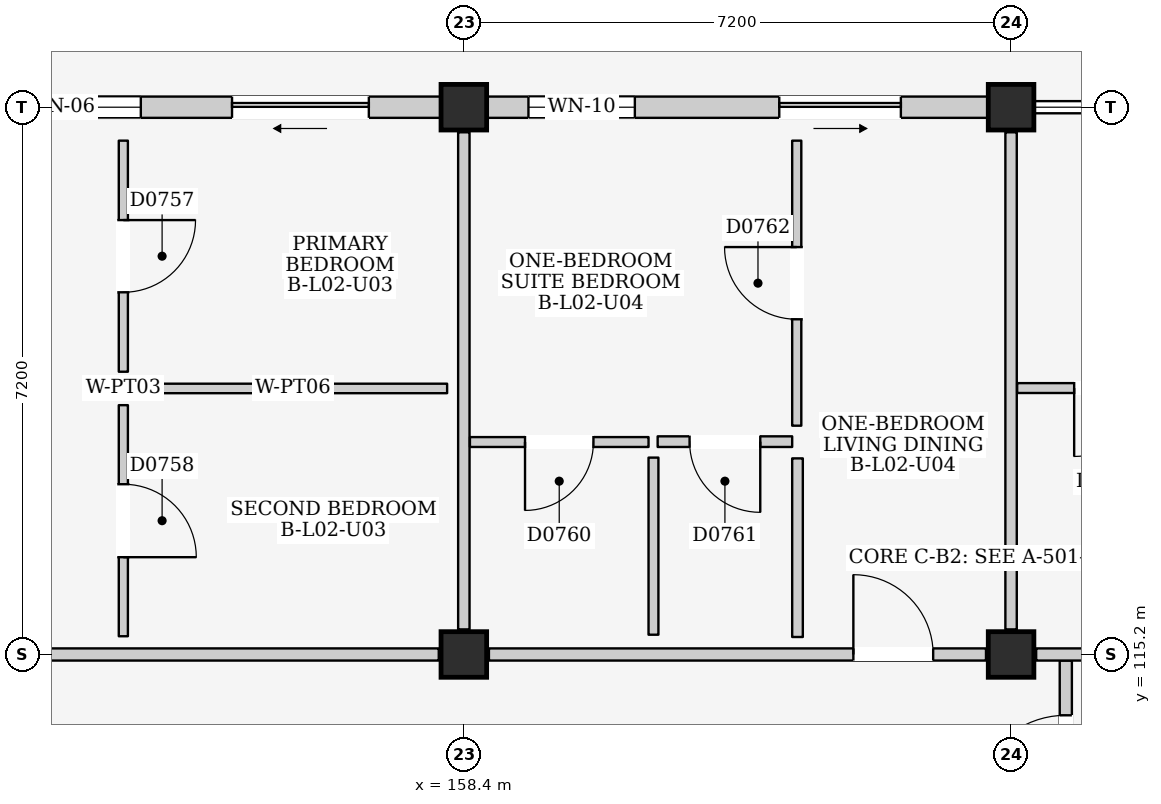
"""IFC4 building model, lengths in metres.
Left out: names, types, materials, properties, quantities, classifications, styles, units other than length and angle.
Written with IfcOpenShell. Run it as: python <this file> out.ifc"""

import sys

from ifc_helpers import new_model, si_unit, direction, frame, frame_2d, origin, origin_2d, place, context, subcontext, project, spatial, rectangle, extrude, element, fill, save


model = new_model("IFC4")
c1 = context("Model", 3, precision=1e-05, world=origin(), true_north=direction((0.0, 1.0)))
c2 = subcontext(c1, "Body", "Model", "MODEL_VIEW")
j1 = project(units=[si_unit("LENGTHUNIT", "METRE"), si_unit("PLANEANGLEUNIT", "RADIAN")], contexts=[c1])
p1 = place(None, origin())
s1 = spatial("IfcSite", under=j1, at=p1, CompositionType="ELEMENT")
p2 = place(p1, origin())
s2 = spatial("IfcBuilding", under=s1, at=p2, CompositionType="ELEMENT")
p3 = place(p2, frame((0.0, 0.0, 9.0)))
s3 = spatial("IfcBuildingStorey", under=s2, at=p3, CompositionType="ELEMENT", Elevation=9.0)
for number, where, z_axis, x_axis in (
    (1, (158.4, 115.2, 0.0), (0.0, 0.0, 1.0), (1.0, 0.0, 0.0)),
    (2, (158.4, 122.4, 0.0), (0.0, 0.0, 1.0), (1.0, 0.0, 0.0)),
    (3, (165.6, 115.2, 0.0), (0.0, 0.0, 1.0), (1.0, 0.0, 0.0)),
    (4, (165.6, 122.4, 0.0), (0.0, 0.0, 1.0), (1.0, 0.0, 0.0)),
):
    element("IfcColumn", number, at=place(p3, frame(where, z_axis=z_axis, x_axis=x_axis)), inside=s3, PredefinedType="COLUMN", context=c2, shape_type="SweptSolid", body=[
        extrude(rectangle(XDim=0.6, YDim=0.6, at=origin_2d()), origin(), (0.0, 0.0, 1.0), 3.2),
    ])
p4 = place(p3, frame((151.5, 122.4, 0.0), z_axis=(0.0, 0.0, 1.0), x_axis=(1.0, 0.0, 0.0)))
e5 = element("IfcWall", 5, at=p4, inside=s3, PredefinedType="ELEMENTEDWALL", context=c2, shape_type="SweptSolid", body=[
    extrude(rectangle(XDim=6.6, YDim=0.28, at=frame_2d((3.3, 0.0))), origin(), (0.0, 0.0, 1.0), 2.425),
])
p5 = place(p4, frame((3.85, 0.0, 0.0)))
e6 = element("IfcOpeningElement", 6, at=p5, cuts=e5, PredefinedType="OPENING", context=c2, shape_type="SweptSolid", body=[
    extrude(rectangle(XDim=1.8, YDim=2.12, at=frame_2d((0.9, 1.06))), frame((0.0, 0.155, 0.0), z_axis=(0.0, -1.0, 0.0), x_axis=(1.0, 0.0, 0.0)), (0.0, 0.0, 1.0), 0.31),
])
p6 = place(p4, frame((0.55, 0.0, 0.665)))
e7 = element("IfcOpeningElement", 7, at=p6, cuts=e5, PredefinedType="OPENING", context=c2, shape_type="SweptSolid", body=[
    extrude(rectangle(XDim=2.1, YDim=1.65, at=frame_2d((1.05, 0.825))), frame((0.0, 0.155, 0.0), z_axis=(0.0, -1.0, 0.0), x_axis=(1.0, 0.0, 0.0)), (0.0, 0.0, 1.0), 0.31),
])
p7 = place(p3, frame((158.7, 122.4, 0.0), z_axis=(0.0, 0.0, 1.0), x_axis=(1.0, 0.0, 0.0)))
e8 = element("IfcWall", 8, at=p7, inside=s3, PredefinedType="ELEMENTEDWALL", context=c2, shape_type="SweptSolid", body=[
    extrude(rectangle(XDim=6.6, YDim=0.28, at=frame_2d((3.3, 0.0))), origin(), (0.0, 0.0, 1.0), 2.425),
])
p8 = place(p7, frame((3.85, 0.0, 0.0)))
e9 = element("IfcOpeningElement", 9, at=p8, cuts=e8, PredefinedType="OPENING", context=c2, shape_type="SweptSolid", body=[
    extrude(rectangle(XDim=1.6, YDim=2.12, at=frame_2d((0.8, 1.06))), frame((0.0, 0.155, 0.0), z_axis=(0.0, -1.0, 0.0), x_axis=(1.0, 0.0, 0.0)), (0.0, 0.0, 1.0), 0.31),
])
p9 = place(p7, frame((0.55, 0.0, 0.9)))
e10 = element("IfcOpeningElement", 10, at=p9, cuts=e8, PredefinedType="OPENING", context=c2, shape_type="SweptSolid", body=[
    extrude(rectangle(XDim=1.4, YDim=1.2, at=frame_2d((0.7, 0.6))), frame((0.0, 0.155, 0.0), z_axis=(0.0, -1.0, 0.0), x_axis=(1.0, 0.0, 0.0)), (0.0, 0.0, 1.0), 0.31),
])
p10 = place(p3, frame((166.32, 110.8, 0.0), z_axis=(0.0, 0.0, 1.0), x_axis=(0.0, 1.0, 0.0)))
e11 = element("IfcWall", 11, at=p10, inside=s3, PredefinedType="PARTITIONING", context=c2, shape_type="SweptSolid", body=[
    extrude(rectangle(XDim=4.32, YDim=0.16, at=frame_2d((2.16, 0.0))), origin(), (0.0, 0.0, 1.0), 2.96),
])
p11 = place(p10, frame((2.4, 0.0, 0.0)))
e12 = element("IfcOpeningElement", 12, at=p11, cuts=e11, PredefinedType="OPENING", context=c2, shape_type="SweptSolid", body=[
    extrude(rectangle(XDim=1.2, YDim=2.2, at=frame_2d((0.6, 1.1))), frame((0.0, 0.095, 0.0), z_axis=(0.0, -1.0, 0.0), x_axis=(1.0, 0.0, 0.0)), (0.0, 0.0, 1.0), 0.19),
])
p12 = place(p3, frame((151.53, 115.2, 0.0), z_axis=(0.0, 0.0, 1.0), x_axis=(1.0, 0.0, 0.0)))
e13 = element("IfcWall", 13, at=p12, inside=s3, PredefinedType="PARTITIONING", context=c2, shape_type="SweptSolid", body=[
    extrude(rectangle(XDim=6.54, YDim=0.16, at=frame_2d((3.27, 0.0))), origin(), (0.0, 0.0, 1.0), 2.345),
])
p13 = place(p12, frame((0.18, 0.0, 0.0)))
e14 = element("IfcOpeningElement", 14, at=p13, cuts=e13, PredefinedType="OPENING", context=c2, shape_type="SweptSolid", body=[
    extrude(rectangle(XDim=1.05, YDim=2.15, at=frame_2d((0.525, 1.075))), frame((0.0, 0.095, 0.0), z_axis=(0.0, -1.0, 0.0), x_axis=(1.0, 0.0, 0.0)), (0.0, 0.0, 1.0), 0.19),
])
p14 = place(p3, frame((158.4, 115.53, 0.0), z_axis=(0.0, 0.0, 1.0), x_axis=(0.0, 1.0, 0.0)))
e15 = element("IfcWall", 15, at=p14, inside=s3, PredefinedType="PARTITIONING", context=c2, shape_type="SweptSolid", body=[
    extrude(rectangle(XDim=6.54, YDim=0.15, at=frame_2d((3.27, 0.0))), origin(), (0.0, 0.0, 1.0), 2.395),
])
p15 = place(p3, frame((153.92, 118.92, 0.0), z_axis=(0.0, 0.0, 1.0), x_axis=(0.0, 1.0, 0.0)))
e16 = element("IfcWall", 16, at=p15, inside=s3, PredefinedType="PARTITIONING", context=c2, shape_type="SweptSolid", body=[
    extrude(rectangle(XDim=3.04, YDim=0.12, at=frame_2d((1.52, 0.0))), origin(), (0.0, 0.0, 1.0), 2.96),
])
p16 = place(p15, frame((1.045, 0.0, 0.0)))
e17 = element("IfcOpeningElement", 17, at=p16, cuts=e16, PredefinedType="OPENING", context=c2, shape_type="SweptSolid", body=[
    extrude(rectangle(XDim=0.95, YDim=2.15, at=frame_2d((0.475, 1.075))), frame((0.0, 0.075, 0.0), z_axis=(0.0, -1.0, 0.0), x_axis=(1.0, 0.0, 0.0)), (0.0, 0.0, 1.0), 0.15),
])
p17 = place(p3, frame((154.12, 118.7, 0.0), z_axis=(0.0, 0.0, 1.0), x_axis=(1.0, 0.0, 0.0)))
e18 = element("IfcWall", 18, at=p17, inside=s3, PredefinedType="PARTITIONING", context=c2, shape_type="SweptSolid", body=[
    extrude(rectangle(XDim=4.06, YDim=0.125, at=frame_2d((2.03, 0.0))), origin(), (0.0, 0.0, 1.0), 2.96),
])
p18 = place(p3, frame((153.92, 115.44, 0.0), z_axis=(0.0, 0.0, 1.0), x_axis=(0.0, 1.0, 0.0)))
e19 = element("IfcWall", 19, at=p18, inside=s3, PredefinedType="PARTITIONING", context=c2, shape_type="SweptSolid", body=[
    extrude(rectangle(XDim=3.04, YDim=0.12, at=frame_2d((1.52, 0.0))), origin(), (0.0, 0.0, 1.0), 2.96),
])
p19 = place(p18, frame((1.04, 0.0, 0.0)))
e20 = element("IfcOpeningElement", 20, at=p19, cuts=e19, PredefinedType="OPENING", context=c2, shape_type="SweptSolid", body=[
    extrude(rectangle(XDim=0.96, YDim=2.15, at=frame_2d((0.48, 1.075))), frame((0.0, 0.075, 0.0), z_axis=(0.0, -1.0, 0.0), x_axis=(1.0, 0.0, 0.0)), (0.0, 0.0, 1.0), 0.15),
])
p20 = place(p3, frame((158.73, 115.2, 0.0), z_axis=(0.0, 0.0, 1.0), x_axis=(1.0, 0.0, 0.0)))
e21 = element("IfcWall", 21, at=p20, inside=s3, PredefinedType="PARTITIONING", context=c2, shape_type="SweptSolid", body=[
    extrude(rectangle(XDim=6.54, YDim=0.16, at=frame_2d((3.27, 0.0))), origin(), (0.0, 0.0, 1.0), 2.345),
])
p21 = place(p20, frame((4.795, 0.0, 0.0)))
e22 = element("IfcOpeningElement", 22, at=p21, cuts=e21, PredefinedType="OPENING", context=c2, shape_type="SweptSolid", body=[
    extrude(rectangle(XDim=1.05, YDim=2.15, at=frame_2d((0.525, 1.075))), frame((0.0, 0.095, 0.0), z_axis=(0.0, -1.0, 0.0), x_axis=(1.0, 0.0, 0.0)), (0.0, 0.0, 1.0), 0.19),
])
p22 = place(p3, frame((165.6, 115.53, 0.0), z_axis=(0.0, 0.0, 1.0), x_axis=(0.0, 1.0, 0.0)))
e23 = element("IfcWall", 23, at=p22, inside=s3, PredefinedType="PARTITIONING", context=c2, shape_type="SweptSolid", body=[
    extrude(rectangle(XDim=6.54, YDim=0.15, at=frame_2d((3.27, 0.0))), origin(), (0.0, 0.0, 1.0), 2.395),
])
p23 = place(p3, frame((158.48, 117.995, 0.0), z_axis=(0.0, 0.0, 1.0), x_axis=(1.0, 0.0, 0.0)))
e24 = element("IfcWall", 24, at=p23, inside=s3, PredefinedType="PARTITIONING", context=c2, shape_type="SweptSolid", body=[
    extrude(rectangle(XDim=2.35, YDim=0.13, at=frame_2d((1.175, 0.0))), origin(), (0.0, 0.0, 1.0), 2.96),
])
p24 = place(p23, frame((0.725, 0.0, 0.0)))
e25 = element("IfcOpeningElement", 25, at=p24, cuts=e24, PredefinedType="OPENING", context=c2, shape_type="SweptSolid", body=[
    extrude(rectangle(XDim=0.9, YDim=2.1, at=frame_2d((0.45, 1.05))), frame((0.0, 0.08, 0.0), z_axis=(0.0, -1.0, 0.0), x_axis=(1.0, 0.0, 0.0)), (0.0, 0.0, 1.0), 0.16),
])
p25 = place(p3, frame((160.895, 115.46, 0.0), z_axis=(0.0, 0.0, 1.0), x_axis=(0.0, 1.0, 0.0)))
e26 = element("IfcWall", 26, at=p25, inside=s3, PredefinedType="PARTITIONING", context=c2, shape_type="SweptSolid", body=[
    extrude(rectangle(XDim=2.33, YDim=0.13, at=frame_2d((1.165, 0.0))), origin(), (0.0, 0.0, 1.0), 2.96),
])
p26 = place(p3, frame((160.95, 118.0, 0.0), z_axis=(0.0, 0.0, 1.0), x_axis=(1.0, 0.0, 0.0)))
e27 = element("IfcWall", 27, at=p26, inside=s3, PredefinedType="PARTITIONING", context=c2, shape_type="SweptSolid", body=[
    extrude(rectangle(XDim=1.77, YDim=0.14, at=frame_2d((0.885, 0.0))), origin(), (0.0, 0.0, 1.0), 2.96),
])
p27 = place(p26, frame((0.42, 0.0, 0.0)))
e28 = element("IfcOpeningElement", 28, at=p27, cuts=e27, PredefinedType="OPENING", context=c2, shape_type="SweptSolid", body=[
    extrude(rectangle(XDim=0.93, YDim=2.14, at=frame_2d((0.465, 1.07))), frame((0.0, 0.085, 0.0), z_axis=(0.0, -1.0, 0.0), x_axis=(1.0, 0.0, 0.0)), (0.0, 0.0, 1.0), 0.17),
])
p28 = place(p3, frame((162.79, 115.43, 0.0), z_axis=(0.0, 0.0, 1.0), x_axis=(0.0, 1.0, 0.0)))
e29 = element("IfcWall", 29, at=p28, inside=s3, PredefinedType="PARTITIONING", context=c2, shape_type="SweptSolid", body=[
    extrude(rectangle(XDim=2.35, YDim=0.14, at=frame_2d((1.175, 0.0))), origin(), (0.0, 0.0, 1.0), 2.96),
])
p29 = place(p3, frame((162.78, 118.21, 0.0), z_axis=(0.0, 0.0, 1.0), x_axis=(0.0, 1.0, 0.0)))
e30 = element("IfcWall", 30, at=p29, inside=s3, PredefinedType="PARTITIONING", context=c2, shape_type="SweptSolid", body=[
    extrude(rectangle(XDim=3.75, YDim=0.12, at=frame_2d((1.875, 0.0))), origin(), (0.0, 0.0, 1.0), 2.96),
])
p30 = place(p29, frame((1.4, 0.0, 0.0)))
e31 = element("IfcOpeningElement", 31, at=p30, cuts=e30, PredefinedType="OPENING", context=c2, shape_type="SweptSolid", body=[
    extrude(rectangle(XDim=0.95, YDim=2.15, at=frame_2d((0.475, 1.075))), frame((0.0, 0.075, 0.0), z_axis=(0.0, -1.0, 0.0), x_axis=(1.0, 0.0, 0.0)), (0.0, 0.0, 1.0), 0.15),
])
p31 = place(p3, frame((165.93, 115.2, 0.0), z_axis=(0.0, 0.0, 1.0), x_axis=(1.0, 0.0, 0.0)))
e32 = element("IfcWall", 32, at=p31, inside=s3, PredefinedType="PARTITIONING", context=c2, shape_type="SweptSolid", body=[
    extrude(rectangle(XDim=6.54, YDim=0.16, at=frame_2d((3.27, 0.0))), origin(), (0.0, 0.0, 1.0), 2.345),
])
p32 = place(p3, frame((165.68, 118.705, 0.0), z_axis=(0.0, 0.0, 1.0), x_axis=(1.0, 0.0, 0.0)))
e33 = element("IfcWall", 33, at=p32, inside=s3, PredefinedType="PARTITIONING", context=c2, shape_type="SweptSolid", body=[
    extrude(rectangle(XDim=2.4, YDim=0.13, at=frame_2d((1.2, 0.0))), origin(), (0.0, 0.0, 1.0), 2.96),
])
p33 = place(p32, frame((0.75, 0.0, 0.0)))
e34 = element("IfcOpeningElement", 34, at=p33, cuts=e33, PredefinedType="OPENING", context=c2, shape_type="SweptSolid", body=[
    extrude(rectangle(XDim=0.9, YDim=2.1, at=frame_2d((0.45, 1.05))), frame((0.0, 0.08, 0.0), z_axis=(0.0, -1.0, 0.0), x_axis=(1.0, 0.0, 0.0)), (0.0, 0.0, 1.0), 0.16),
])
p34 = place(p5, frame((1.8, 0.0, 0.0), z_axis=(0.0, 0.0, 1.0), x_axis=(-1.0, 0.0, 0.0)))
e35 = element("IfcDoor", 35, at=p34, inside=s3, OperationType="SLIDING_TO_LEFT", PredefinedType="DOOR", context=c2, shape_type="SweptSolid", body=[
    extrude(rectangle(XDim=1.8, YDim=2.12, at=frame_2d((0.9, 1.06))), frame((0.0, 0.025, 0.0), z_axis=(0.0, -1.0, 0.0), x_axis=(1.0, 0.0, 0.0)), (0.0, 0.0, 1.0), 0.05),
])
fill(e6, e35)
p35 = place(p6, origin())
e36 = element("IfcWindow", 36, at=p35, inside=s3, PartitioningType="DOUBLE_PANEL_VERTICAL", PredefinedType="WINDOW", context=c2, shape_type="SweptSolid", body=[
    extrude(rectangle(XDim=2.1, YDim=1.65, at=frame_2d((1.05, 0.825))), frame((0.0, 0.03, 0.0), z_axis=(0.0, -1.0, 0.0), x_axis=(1.0, 0.0, 0.0)), (0.0, 0.0, 1.0), 0.06),
])
fill(e7, e36)
p36 = place(p8, frame((1.6, 0.0, 0.0), z_axis=(0.0, 0.0, 1.0), x_axis=(-1.0, 0.0, 0.0)))
e37 = element("IfcDoor", 37, at=p36, inside=s3, OperationType="SLIDING_TO_RIGHT", PredefinedType="DOOR", context=c2, shape_type="SweptSolid", body=[
    extrude(rectangle(XDim=1.6, YDim=2.12, at=frame_2d((0.8, 1.06))), frame((0.0, 0.025, 0.0), z_axis=(0.0, -1.0, 0.0), x_axis=(1.0, 0.0, 0.0)), (0.0, 0.0, 1.0), 0.05),
])
fill(e9, e37)
p37 = place(p9, origin())
e38 = element("IfcWindow", 38, at=p37, inside=s3, PartitioningType="DOUBLE_PANEL_HORIZONTAL", PredefinedType="WINDOW", context=c2, shape_type="SweptSolid", body=[
    extrude(rectangle(XDim=1.4, YDim=1.2, at=frame_2d((0.7, 0.6))), frame((0.0, 0.03, 0.0), z_axis=(0.0, -1.0, 0.0), x_axis=(1.0, 0.0, 0.0)), (0.0, 0.0, 1.0), 0.06),
])
fill(e10, e38)
p38 = place(p11, origin())
e39 = element("IfcDoor", 39, at=p38, inside=s3, OperationType="SINGLE_SWING_LEFT", PredefinedType="DOOR", context=c2, shape_type="SweptSolid", body=[
    extrude(rectangle(XDim=1.2, YDim=2.2, at=frame_2d((0.6, 1.1))), frame((0.0, 0.025, 0.0), z_axis=(0.0, -1.0, 0.0), x_axis=(1.0, 0.0, 0.0)), (0.0, 0.0, 1.0), 0.05),
])
fill(e12, e39)
p39 = place(p16, frame((0.95, 0.0, 0.0), z_axis=(0.0, 0.0, 1.0), x_axis=(-1.0, 0.0, 0.0)))
e40 = element("IfcDoor", 40, at=p39, inside=s3, OperationType="SINGLE_SWING_LEFT", PredefinedType="DOOR", context=c2, shape_type="SweptSolid", body=[
    extrude(rectangle(XDim=0.95, YDim=2.15, at=frame_2d((0.475, 1.075))), frame((0.0, 0.025, 0.0), z_axis=(0.0, -1.0, 0.0), x_axis=(1.0, 0.0, 0.0)), (0.0, 0.0, 1.0), 0.05),
])
fill(e17, e40)
p40 = place(p19, frame((0.96, 0.0, 0.0), z_axis=(0.0, 0.0, 1.0), x_axis=(-1.0, 0.0, 0.0)))
e41 = element("IfcDoor", 41, at=p40, inside=s3, OperationType="SINGLE_SWING_RIGHT", PredefinedType="DOOR", context=c2, shape_type="SweptSolid", body=[
    extrude(rectangle(XDim=0.96, YDim=2.15, at=frame_2d((0.48, 1.075))), frame((0.0, 0.025, 0.0), z_axis=(0.0, -1.0, 0.0), x_axis=(1.0, 0.0, 0.0)), (0.0, 0.0, 1.0), 0.05),
])
fill(e20, e41)
p41 = place(p21, origin())
e42 = element("IfcDoor", 42, at=p41, inside=s3, OperationType="SINGLE_SWING_LEFT", PredefinedType="DOOR", context=c2, shape_type="SweptSolid", body=[
    extrude(rectangle(XDim=1.05, YDim=2.15, at=frame_2d((0.525, 1.075))), frame((0.0, 0.025, 0.0), z_axis=(0.0, -1.0, 0.0), x_axis=(1.0, 0.0, 0.0)), (0.0, 0.0, 1.0), 0.05),
])
fill(e22, e42)
p42 = place(p24, frame((0.9, 0.0, 0.0), z_axis=(0.0, 0.0, 1.0), x_axis=(-1.0, 0.0, 0.0)))
e43 = element("IfcDoor", 43, at=p42, inside=s3, OperationType="SINGLE_SWING_RIGHT", PredefinedType="DOOR", context=c2, shape_type="SweptSolid", body=[
    extrude(rectangle(XDim=0.9, YDim=2.1, at=frame_2d((0.45, 1.05))), frame((0.0, 0.025, 0.0), z_axis=(0.0, -1.0, 0.0), x_axis=(1.0, 0.0, 0.0)), (0.0, 0.0, 1.0), 0.05),
])
fill(e25, e43)
p43 = place(p27, frame((0.93, 0.0, 0.0), z_axis=(0.0, 0.0, 1.0), x_axis=(-1.0, 0.0, 0.0)))
e44 = element("IfcDoor", 44, at=p43, inside=s3, OperationType="SINGLE_SWING_LEFT", PredefinedType="DOOR", context=c2, shape_type="SweptSolid", body=[
    extrude(rectangle(XDim=0.93, YDim=2.14, at=frame_2d((0.465, 1.07))), frame((0.0, 0.025, 0.0), z_axis=(0.0, -1.0, 0.0), x_axis=(1.0, 0.0, 0.0)), (0.0, 0.0, 1.0), 0.05),
])
fill(e28, e44)
p44 = place(p30, origin())
e45 = element("IfcDoor", 45, at=p44, inside=s3, OperationType="SINGLE_SWING_RIGHT", PredefinedType="DOOR", context=c2, shape_type="SweptSolid", body=[
    extrude(rectangle(XDim=0.95, YDim=2.15, at=frame_2d((0.475, 1.075))), frame((0.0, 0.025, 0.0), z_axis=(0.0, -1.0, 0.0), x_axis=(1.0, 0.0, 0.0)), (0.0, 0.0, 1.0), 0.05),
])
fill(e31, e45)
p45 = place(p33, frame((0.9, 0.0, 0.0), z_axis=(0.0, 0.0, 1.0), x_axis=(-1.0, 0.0, 0.0)))
e46 = element("IfcDoor", 46, at=p45, inside=s3, OperationType="SINGLE_SWING_RIGHT", PredefinedType="DOOR", context=c2, shape_type="SweptSolid", body=[
    extrude(rectangle(XDim=0.9, YDim=2.1, at=frame_2d((0.45, 1.05))), frame((0.0, 0.025, 0.0), z_axis=(0.0, -1.0, 0.0), x_axis=(1.0, 0.0, 0.0)), (0.0, 0.0, 1.0), 0.05),
])
fill(e34, e46)
save(model, sys.argv[1])
